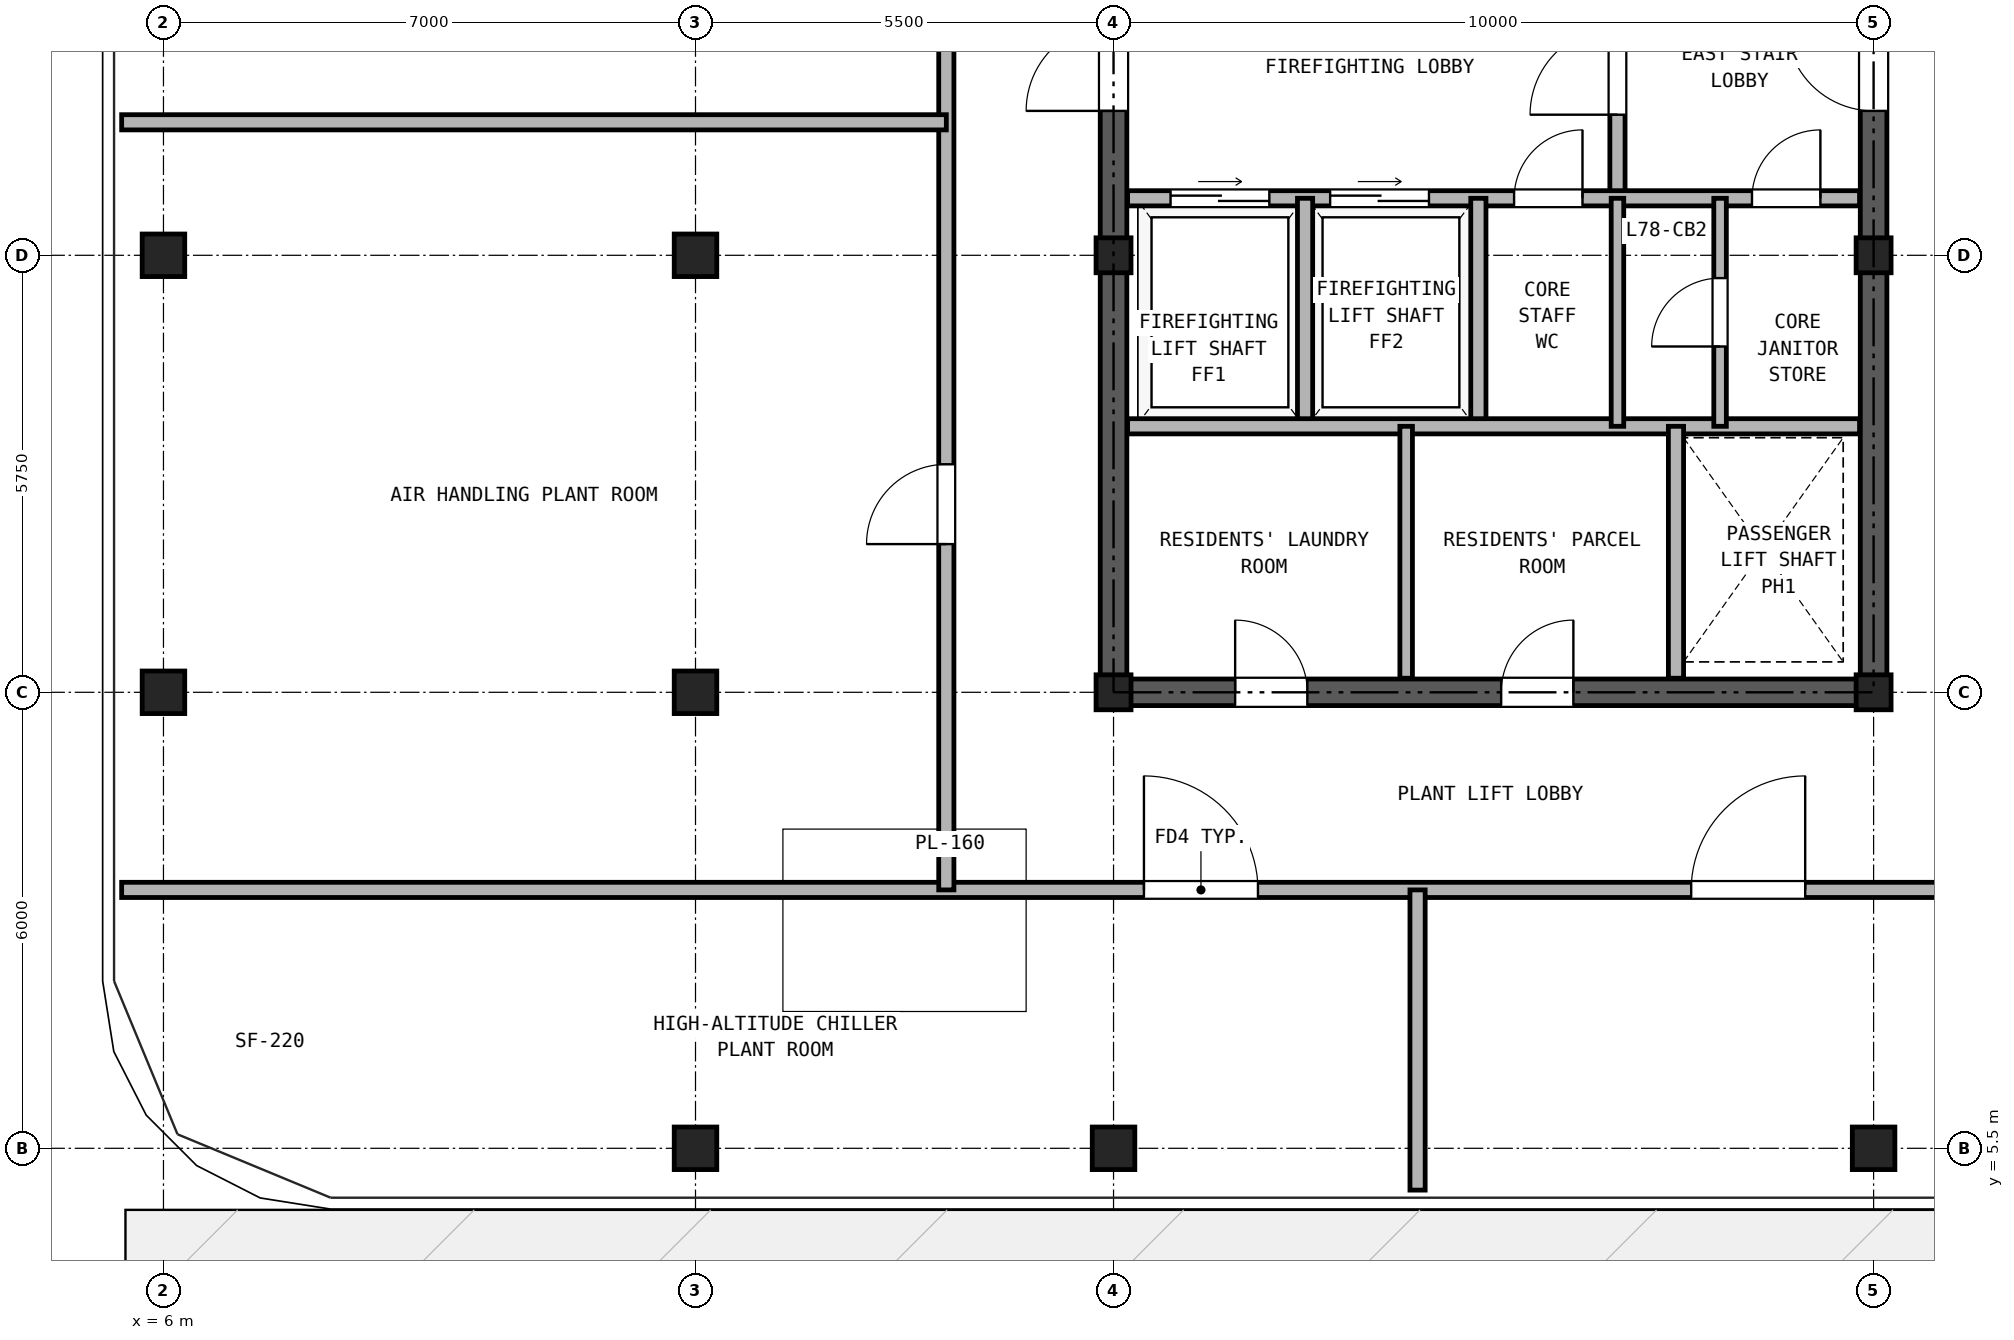
"""IFC4 building model, lengths in metres.
Left out: names, types, materials, properties, quantities, classifications, styles, units other than length and angle.
Written with IfcOpenShell. Run it as: python <this file> out.ifc"""

import sys

from ifc_helpers import new_model, si_unit, direction, frame, frame_2d, origin, origin_2d, place, context, subcontext, project, spatial, rectangle, hollow_rectangle, extrude, source, transform, mapped, element, fill, save


model = new_model("IFC4")
c1 = context("Model", 3, precision=1e-05, world=origin(), true_north=direction((0.0, 1.0)))
c2 = subcontext(c1, "Body", "Model", "MODEL_VIEW")
j1 = project(units=[si_unit("LENGTHUNIT", "METRE"), si_unit("PLANEANGLEUNIT", "RADIAN")], contexts=[c1])
p1 = place(None, origin())
s1 = spatial("IfcSite", under=j1, at=p1, CompositionType="ELEMENT")
p2 = place(p1, origin())
s2 = spatial("IfcBuilding", under=s1, at=p2, CompositionType="ELEMENT")
p3 = place(p2, frame((0.0, 0.0, 271.3)))
s3 = spatial("IfcBuildingStorey", under=s2, at=p3, CompositionType="ELEMENT", Elevation=271.3)
m1 = source(origin(), c2, "Body", "SweptSolid", [
    extrude(hollow_rectangle(XDim=0.56, YDim=0.56, WallThickness=0.03, at=origin_2d()), origin(), (0.0, 0.0, 1.0), 3.38),
])
for number, where, z_axis, x_axis in (
    (1, (13.0, 5.5, 0.0), (0.0, 0.0, 1.0), (1.0, 0.0, 0.0)),
    (2, (18.5, 5.5, 0.0), (0.0, 0.0, 1.0), (1.0, 0.0, 0.0)),
    (3, (28.5, 5.5, 0.0), (0.0, 0.0, 1.0), (1.0, 0.0, 0.0)),
    (4, (6.0, 11.5, 0.0), (0.0, 0.0, 1.0), (1.0, 0.0, 0.0)),
    (5, (6.0, 17.25, 0.0), (0.0, 0.0, 1.0), (1.0, 0.0, 0.0)),
    (6, (13.0, 11.5, 0.0), (0.0, 0.0, 1.0), (1.0, 0.0, 0.0)),
    (7, (13.0, 17.25, 0.0), (0.0, 0.0, 1.0), (1.0, 0.0, 0.0)),
):
    element("IfcColumn", number, at=place(p3, frame(where, z_axis=z_axis, x_axis=x_axis)), inside=s3, PredefinedType="COLUMN", context=c2, shape_type="MappedRepresentation", body=[
        mapped(m1, transform((0.0, 0.0, 0.0), x_axis=(1.0, 0.0, 0.0), y_axis=(0.0, 1.0, 0.0), z_axis=(0.0, 0.0, 1.0), scale=1.0)),
    ])
m2 = source(origin(), c2, "Body", "SweptSolid", [
    extrude(hollow_rectangle(XDim=0.46, YDim=0.46, WallThickness=0.025, at=origin_2d()), origin(), (0.0, 0.0, 1.0), 3.38),
])
for number, where, z_axis, x_axis in (
    (8, (18.5, 11.5, 0.0), (0.0, 0.0, 1.0), (1.0, 0.0, 0.0)),
    (9, (18.5, 17.25, 0.0), (0.0, 0.0, 1.0), (1.0, 0.0, 0.0)),
    (10, (28.5, 11.5, 0.0), (0.0, 0.0, 1.0), (1.0, 0.0, 0.0)),
    (11, (28.5, 17.25, 0.0), (0.0, 0.0, 1.0), (1.0, 0.0, 0.0)),
):
    element("IfcColumn", number, at=place(p3, frame(where, z_axis=z_axis, x_axis=x_axis)), inside=s3, PredefinedType="COLUMN", context=c2, shape_type="MappedRepresentation", body=[
        mapped(m2, transform((0.0, 0.0, 0.0), x_axis=(1.0, 0.0, 0.0), y_axis=(0.0, 1.0, 0.0), z_axis=(0.0, 0.0, 1.0), scale=1.0)),
    ])
p4 = place(p3, frame((18.325, 11.5, 0.0), z_axis=(0.0, 0.0, 1.0), x_axis=(1.0, 0.0, 0.0)))
e12 = element("IfcWall", 12, at=p4, inside=s3, PredefinedType="SHEAR", context=c2, shape_type="SweptSolid", body=[
    extrude(rectangle(XDim=10.35, YDim=0.35, at=frame_2d((5.175, 0.0))), origin(), (0.0, 0.0, 1.0), 3.38),
])
p5 = place(p4, frame((1.775, 0.0, 0.0)))
e13 = element("IfcOpeningElement", 13, at=p5, cuts=e12, PredefinedType="OPENING", context=c2, shape_type="SweptSolid", body=[
    extrude(rectangle(XDim=0.95, YDim=2.15, at=frame_2d((0.475, 1.075))), frame((0.0, 0.185, 0.0), z_axis=(0.0, -1.0, 0.0), x_axis=(1.0, 0.0, 0.0)), (0.0, 0.0, 1.0), 0.37),
])
p6 = place(p4, frame((5.275, 0.0, 0.0)))
e14 = element("IfcOpeningElement", 14, at=p6, cuts=e12, PredefinedType="OPENING", context=c2, shape_type="SweptSolid", body=[
    extrude(rectangle(XDim=0.95, YDim=2.15, at=frame_2d((0.475, 1.075))), frame((0.0, 0.185, 0.0), z_axis=(0.0, -1.0, 0.0), x_axis=(1.0, 0.0, 0.0)), (0.0, 0.0, 1.0), 0.37),
])
p7 = place(p3, frame((18.5, 11.675, 0.0), z_axis=(0.0, 0.0, 1.0), x_axis=(0.0, 1.0, 0.0)))
e15 = element("IfcWall", 15, at=p7, inside=s3, PredefinedType="SHEAR", context=c2, shape_type="SweptSolid", body=[
    extrude(rectangle(XDim=16.9, YDim=0.35, at=frame_2d((8.45, 0.0))), origin(), (0.0, 0.0, 1.0), 3.38),
])
p8 = place(p7, frame((7.475, 0.0, 0.0)))
e16 = element("IfcOpeningElement", 16, at=p8, cuts=e15, PredefinedType="OPENING", context=c2, shape_type="SweptSolid", body=[
    extrude(rectangle(XDim=1.15, YDim=2.2, at=frame_2d((0.575, 1.1))), frame((0.0, 0.185, 0.0), z_axis=(0.0, -1.0, 0.0), x_axis=(1.0, 0.0, 0.0)), (0.0, 0.0, 1.0), 0.37),
])
p9 = place(p3, frame((28.5, 11.675, 0.0), z_axis=(0.0, 0.0, 1.0), x_axis=(0.0, 1.0, 0.0)))
e17 = element("IfcWall", 17, at=p9, inside=s3, PredefinedType="SHEAR", context=c2, shape_type="SweptSolid", body=[
    extrude(rectangle(XDim=16.9, YDim=0.35, at=frame_2d((8.45, 0.0))), origin(), (0.0, 0.0, 1.0), 3.38),
])
p10 = place(p9, frame((7.475, 0.0, 0.0)))
e18 = element("IfcOpeningElement", 18, at=p10, cuts=e17, PredefinedType="OPENING", context=c2, shape_type="SweptSolid", body=[
    extrude(rectangle(XDim=1.15, YDim=2.2, at=frame_2d((0.575, 1.1))), frame((0.0, 0.185, 0.0), z_axis=(0.0, -1.0, 0.0), x_axis=(1.0, 0.0, 0.0)), (0.0, 0.0, 1.0), 0.37),
])
p11 = place(p3, frame((25.13, 18.0, 0.0), z_axis=(0.0, 0.0, 1.0), x_axis=(0.0, 1.0, 0.0)))
e19 = element("IfcWall", 19, at=p11, inside=s3, PredefinedType="PARTITIONING", context=c2, shape_type="SweptSolid", body=[
    extrude(rectangle(XDim=3.39, YDim=0.2, at=frame_2d((1.695, 0.0))), origin(), (0.0, 0.0, 1.0), 3.38),
])
p12 = place(p11, frame((1.1, 0.0, 0.0)))
e20 = element("IfcOpeningElement", 20, at=p12, cuts=e19, PredefinedType="OPENING", context=c2, shape_type="SweptSolid", body=[
    extrude(rectangle(XDim=1.15, YDim=2.2, at=frame_2d((0.575, 1.1))), frame((0.0, 0.11, 0.0), z_axis=(0.0, -1.0, 0.0), x_axis=(1.0, 0.0, 0.0)), (0.0, 0.0, 1.0), 0.22),
])
p13 = place(p3, frame((18.685, 18.0, 0.0), z_axis=(0.0, 0.0, 1.0), x_axis=(1.0, 0.0, 0.0)))
e21 = element("IfcWall", 21, at=p13, inside=s3, PredefinedType="PARTITIONING", context=c2, shape_type="SweptSolid", body=[
    extrude(rectangle(XDim=9.63, YDim=0.2, at=frame_2d((4.815, 0.0))), origin(), (0.0, 0.0, 1.0), 3.38),
])
p14 = place(p13, frame((0.565, 0.0, 0.0)))
e22 = element("IfcOpeningElement", 22, at=p14, cuts=e21, PredefinedType="OPENING", context=c2, shape_type="SweptSolid", body=[
    extrude(rectangle(XDim=1.3, YDim=2.3, at=frame_2d((0.65, 1.15))), frame((0.0, 0.11, 0.0), z_axis=(0.0, -1.0, 0.0), x_axis=(1.0, 0.0, 0.0)), (0.0, 0.0, 1.0), 0.22),
])
p15 = place(p13, frame((2.665, 0.0, 0.0)))
e23 = element("IfcOpeningElement", 23, at=p15, cuts=e21, PredefinedType="OPENING", context=c2, shape_type="SweptSolid", body=[
    extrude(rectangle(XDim=1.3, YDim=2.3, at=frame_2d((0.65, 1.15))), frame((0.0, 0.11, 0.0), z_axis=(0.0, -1.0, 0.0), x_axis=(1.0, 0.0, 0.0)), (0.0, 0.0, 1.0), 0.22),
])
p16 = place(p13, frame((5.085, 0.0, 0.0)))
e24 = element("IfcOpeningElement", 24, at=p16, cuts=e21, PredefinedType="OPENING", context=c2, shape_type="SweptSolid", body=[
    extrude(rectangle(XDim=0.9, YDim=2.05, at=frame_2d((0.45, 1.025))), frame((0.0, 0.11, 0.0), z_axis=(0.0, -1.0, 0.0), x_axis=(1.0, 0.0, 0.0)), (0.0, 0.0, 1.0), 0.22),
])
p17 = place(p13, frame((8.215, 0.0, 0.0)))
e25 = element("IfcOpeningElement", 25, at=p17, cuts=e21, PredefinedType="OPENING", context=c2, shape_type="SweptSolid", body=[
    extrude(rectangle(XDim=0.9, YDim=2.05, at=frame_2d((0.45, 1.025))), frame((0.0, 0.11, 0.0), z_axis=(0.0, -1.0, 0.0), x_axis=(1.0, 0.0, 0.0)), (0.0, 0.0, 1.0), 0.22),
])
for number, where, z_axis, x_axis in (
    (26, (21.02, 15.0, 0.0), (0.0, 0.0, 1.0), (0.0, 1.0, 0.0)),
    (27, (23.3, 15.0, 0.0), (0.0, 0.0, 1.0), (0.0, 1.0, 0.0)),
):
    element("IfcWall", number, at=place(p3, frame(where, z_axis=z_axis, x_axis=x_axis)), inside=s3, PredefinedType="PARTITIONING", context=c2, shape_type="SweptSolid", body=[
        extrude(rectangle(XDim=3.0, YDim=0.2, at=frame_2d((1.5, 0.0))), origin(), (0.0, 0.0, 1.0), 3.38),
    ])
p18 = place(p3, frame((18.685, 15.0, 0.0), z_axis=(0.0, 0.0, 1.0), x_axis=(1.0, 0.0, 0.0)))
e28 = element("IfcWall", 28, at=p18, inside=s3, PredefinedType="PARTITIONING", context=c2, shape_type="SweptSolid", body=[
    extrude(rectangle(XDim=9.63, YDim=0.2, at=frame_2d((4.815, 0.0))), origin(), (0.0, 0.0, 1.0), 3.38),
])
p19 = place(p3, frame((25.13, 15.0, 0.0), z_axis=(0.0, 0.0, 1.0), x_axis=(0.0, 1.0, 0.0)))
e29 = element("IfcWall", 29, at=p19, inside=s3, PredefinedType="PARTITIONING", context=c2, shape_type="SweptSolid", body=[
    extrude(rectangle(XDim=3.0, YDim=0.165, at=frame_2d((1.5, 0.0))), origin(), (0.0, 0.0, 1.0), 3.38),
])
p20 = place(p3, frame((26.48, 15.0, 0.0), z_axis=(0.0, 0.0, 1.0), x_axis=(0.0, 1.0, 0.0)))
e30 = element("IfcWall", 30, at=p20, inside=s3, PredefinedType="PARTITIONING", context=c2, shape_type="SweptSolid", body=[
    extrude(rectangle(XDim=3.0, YDim=0.165, at=frame_2d((1.5, 0.0))), origin(), (0.0, 0.0, 1.0), 3.38),
])
p21 = place(p20, frame((1.05, 0.0, 0.0)))
e31 = element("IfcOpeningElement", 31, at=p21, cuts=e30, PredefinedType="OPENING", context=c2, shape_type="SweptSolid", body=[
    extrude(rectangle(XDim=0.9, YDim=2.05, at=frame_2d((0.45, 1.025))), frame((0.0, 0.093, 0.0), z_axis=(0.0, -1.0, 0.0), x_axis=(1.0, 0.0, 0.0)), (0.0, 0.0, 1.0), 0.185),
])
p22 = place(p3, frame((22.35, 11.685, 0.0), z_axis=(0.0, 0.0, 1.0), x_axis=(0.0, 1.0, 0.0)))
e32 = element("IfcWall", 32, at=p22, inside=s3, PredefinedType="PARTITIONING", context=c2, shape_type="SweptSolid", body=[
    extrude(rectangle(XDim=3.315, YDim=0.165, at=frame_2d((1.657, 0.0))), origin(), (0.0, 0.0, 1.0), 3.38),
])
p23 = place(p3, frame((25.9, 11.685, 0.0), z_axis=(0.0, 0.0, 1.0), x_axis=(0.0, 1.0, 0.0)))
e33 = element("IfcWall", 33, at=p23, inside=s3, PredefinedType="PARTITIONING", context=c2, shape_type="SweptSolid", body=[
    extrude(rectangle(XDim=3.315, YDim=0.2, at=frame_2d((1.657, 0.0))), origin(), (0.0, 0.0, 1.0), 3.38),
])
p24 = place(p3, frame((5.45, 8.9, 0.0), z_axis=(0.0, 0.0, 1.0), x_axis=(1.0, 0.0, 0.0)))
e34 = element("IfcWall", 34, at=p24, inside=s3, PredefinedType="PARTITIONING", context=c2, shape_type="SweptSolid", body=[
    extrude(rectangle(XDim=36.1, YDim=0.2, at=frame_2d((18.05, 0.0))), origin(), (0.0, 0.0, 1.0), 3.38),
])
p25 = place(p24, frame((13.45, 0.0, 0.0)))
e35 = element("IfcOpeningElement", 35, at=p25, cuts=e34, PredefinedType="OPENING", context=c2, shape_type="SweptSolid", body=[
    extrude(rectangle(XDim=1.5, YDim=2.25, at=frame_2d((0.75, 1.125))), frame((0.0, 0.11, 0.0), z_axis=(0.0, -1.0, 0.0), x_axis=(1.0, 0.0, 0.0)), (0.0, 0.0, 1.0), 0.22),
])
p26 = place(p24, frame((20.65, 0.0, 0.0)))
e36 = element("IfcOpeningElement", 36, at=p26, cuts=e34, PredefinedType="OPENING", context=c2, shape_type="SweptSolid", body=[
    extrude(rectangle(XDim=1.5, YDim=2.25, at=frame_2d((0.75, 1.125))), frame((0.0, 0.11, 0.0), z_axis=(0.0, -1.0, 0.0), x_axis=(1.0, 0.0, 0.0)), (0.0, 0.0, 1.0), 0.22),
])
p27 = place(p3, frame((16.3, 8.9, 0.0), z_axis=(0.0, 0.0, 1.0), x_axis=(0.0, 1.0, 0.0)))
e37 = element("IfcWall", 37, at=p27, inside=s3, PredefinedType="PARTITIONING", context=c2, shape_type="SweptSolid", body=[
    extrude(rectangle(XDim=19.85, YDim=0.2, at=frame_2d((9.925, 0.0))), origin(), (0.0, 0.0, 1.0), 3.38),
])
p28 = place(p27, frame((4.55, 0.0, 0.0)))
e38 = element("IfcOpeningElement", 38, at=p28, cuts=e37, PredefinedType="OPENING", context=c2, shape_type="SweptSolid", body=[
    extrude(rectangle(XDim=1.05, YDim=2.15, at=frame_2d((0.525, 1.075))), frame((0.0, 0.11, 0.0), z_axis=(0.0, -1.0, 0.0), x_axis=(1.0, 0.0, 0.0)), (0.0, 0.0, 1.0), 0.22),
])
p29 = place(p27, frame((14.475, 0.0, 0.0)))
e39 = element("IfcOpeningElement", 39, at=p29, cuts=e37, PredefinedType="OPENING", context=c2, shape_type="SweptSolid", body=[
    extrude(rectangle(XDim=1.05, YDim=2.15, at=frame_2d((0.525, 1.075))), frame((0.0, 0.11, 0.0), z_axis=(0.0, -1.0, 0.0), x_axis=(1.0, 0.0, 0.0)), (0.0, 0.0, 1.0), 0.22),
])
p30 = place(p3, frame((22.5, 4.95, 0.0), z_axis=(0.0, 0.0, 1.0), x_axis=(0.0, 1.0, 0.0)))
e40 = element("IfcWall", 40, at=p30, inside=s3, PredefinedType="PARTITIONING", context=c2, shape_type="SweptSolid", body=[
    extrude(rectangle(XDim=3.95, YDim=0.2, at=frame_2d((1.975, 0.0))), origin(), (0.0, 0.0, 1.0), 3.38),
])
p31 = place(p3, frame((5.45, 19.0, 0.0), z_axis=(0.0, 0.0, 1.0), x_axis=(1.0, 0.0, 0.0)))
e41 = element("IfcWall", 41, at=p31, inside=s3, PredefinedType="PARTITIONING", context=c2, shape_type="SweptSolid", body=[
    extrude(rectangle(XDim=10.85, YDim=0.2, at=frame_2d((5.425, 0.0))), origin(), (0.0, 0.0, 1.0), 3.38),
])
p32 = place(p12, origin())
e42 = element("IfcDoor", 42, at=p32, inside=s3, OperationType="SINGLE_SWING_LEFT", PredefinedType="DOOR", context=c2, shape_type="SweptSolid", body=[
    extrude(rectangle(XDim=1.15, YDim=2.2, at=frame_2d((0.575, 1.1))), frame((0.0, 0.025, 0.0), z_axis=(0.0, -1.0, 0.0), x_axis=(1.0, 0.0, 0.0)), (0.0, 0.0, 1.0), 0.05),
])
fill(e20, e42)
p33 = place(p14, origin())
e43 = element("IfcDoor", 43, at=p33, inside=s3, OperationType="DOUBLE_DOOR_SLIDING", PredefinedType="DOOR", context=c2, shape_type="SweptSolid", body=[
    extrude(rectangle(XDim=1.3, YDim=2.3, at=frame_2d((0.65, 1.15))), frame((0.0, 0.025, 0.0), z_axis=(0.0, -1.0, 0.0), x_axis=(1.0, 0.0, 0.0)), (0.0, 0.0, 1.0), 0.05),
])
fill(e22, e43)
p34 = place(p15, origin())
e44 = element("IfcDoor", 44, at=p34, inside=s3, OperationType="DOUBLE_DOOR_SLIDING", PredefinedType="DOOR", context=c2, shape_type="SweptSolid", body=[
    extrude(rectangle(XDim=1.3, YDim=2.3, at=frame_2d((0.65, 1.15))), frame((0.0, 0.025, 0.0), z_axis=(0.0, -1.0, 0.0), x_axis=(1.0, 0.0, 0.0)), (0.0, 0.0, 1.0), 0.05),
])
fill(e23, e44)
p35 = place(p16, frame((0.9, 0.0, 0.0), z_axis=(0.0, 0.0, 1.0), x_axis=(-1.0, 0.0, 0.0)))
e45 = element("IfcDoor", 45, at=p35, inside=s3, OperationType="SINGLE_SWING_RIGHT", PredefinedType="DOOR", context=c2, shape_type="SweptSolid", body=[
    extrude(rectangle(XDim=0.9, YDim=2.05, at=frame_2d((0.45, 1.025))), frame((0.0, 0.025, 0.0), z_axis=(0.0, -1.0, 0.0), x_axis=(1.0, 0.0, 0.0)), (0.0, 0.0, 1.0), 0.05),
])
fill(e24, e45)
p36 = place(p21, origin())
e46 = element("IfcDoor", 46, at=p36, inside=s3, OperationType="SINGLE_SWING_LEFT", PredefinedType="DOOR", context=c2, shape_type="SweptSolid", body=[
    extrude(rectangle(XDim=0.9, YDim=2.05, at=frame_2d((0.45, 1.025))), frame((0.0, 0.025, 0.0), z_axis=(0.0, -1.0, 0.0), x_axis=(1.0, 0.0, 0.0)), (0.0, 0.0, 1.0), 0.05),
])
fill(e31, e46)
p37 = place(p17, frame((0.9, 0.0, 0.0), z_axis=(0.0, 0.0, 1.0), x_axis=(-1.0, 0.0, 0.0)))
e47 = element("IfcDoor", 47, at=p37, inside=s3, OperationType="SINGLE_SWING_RIGHT", PredefinedType="DOOR", context=c2, shape_type="SweptSolid", body=[
    extrude(rectangle(XDim=0.9, YDim=2.05, at=frame_2d((0.45, 1.025))), frame((0.0, 0.025, 0.0), z_axis=(0.0, -1.0, 0.0), x_axis=(1.0, 0.0, 0.0)), (0.0, 0.0, 1.0), 0.05),
])
fill(e25, e47)
p38 = place(p8, frame((1.15, 0.0, 0.0), z_axis=(0.0, 0.0, 1.0), x_axis=(-1.0, 0.0, 0.0)))
e48 = element("IfcDoor", 48, at=p38, inside=s3, OperationType="SINGLE_SWING_LEFT", PredefinedType="DOOR", context=c2, shape_type="SweptSolid", body=[
    extrude(rectangle(XDim=1.15, YDim=2.2, at=frame_2d((0.575, 1.1))), frame((0.0, 0.025, 0.0), z_axis=(0.0, -1.0, 0.0), x_axis=(1.0, 0.0, 0.0)), (0.0, 0.0, 1.0), 0.05),
])
fill(e16, e48)
p39 = place(p10, origin())
e49 = element("IfcDoor", 49, at=p39, inside=s3, OperationType="SINGLE_SWING_RIGHT", PredefinedType="DOOR", context=c2, shape_type="SweptSolid", body=[
    extrude(rectangle(XDim=1.15, YDim=2.2, at=frame_2d((0.575, 1.1))), frame((0.0, 0.025, 0.0), z_axis=(0.0, -1.0, 0.0), x_axis=(1.0, 0.0, 0.0)), (0.0, 0.0, 1.0), 0.05),
])
fill(e18, e49)
p40 = place(p5, frame((0.95, 0.0, 0.0), z_axis=(0.0, 0.0, 1.0), x_axis=(-1.0, 0.0, 0.0)))
e50 = element("IfcDoor", 50, at=p40, inside=s3, OperationType="SINGLE_SWING_LEFT", PredefinedType="DOOR", context=c2, shape_type="SweptSolid", body=[
    extrude(rectangle(XDim=0.95, YDim=2.15, at=frame_2d((0.475, 1.075))), frame((0.0, 0.025, 0.0), z_axis=(0.0, -1.0, 0.0), x_axis=(1.0, 0.0, 0.0)), (0.0, 0.0, 1.0), 0.05),
])
fill(e13, e50)
p41 = place(p6, frame((0.95, 0.0, 0.0), z_axis=(0.0, 0.0, 1.0), x_axis=(-1.0, 0.0, 0.0)))
e51 = element("IfcDoor", 51, at=p41, inside=s3, OperationType="SINGLE_SWING_RIGHT", PredefinedType="DOOR", context=c2, shape_type="SweptSolid", body=[
    extrude(rectangle(XDim=0.95, YDim=2.15, at=frame_2d((0.475, 1.075))), frame((0.0, 0.025, 0.0), z_axis=(0.0, -1.0, 0.0), x_axis=(1.0, 0.0, 0.0)), (0.0, 0.0, 1.0), 0.05),
])
fill(e14, e51)
p42 = place(p25, frame((1.5, 0.0, 0.0), z_axis=(0.0, 0.0, 1.0), x_axis=(-1.0, 0.0, 0.0)))
e52 = element("IfcDoor", 52, at=p42, inside=s3, OperationType="SINGLE_SWING_LEFT", PredefinedType="DOOR", context=c2, shape_type="SweptSolid", body=[
    extrude(rectangle(XDim=1.5, YDim=2.25, at=frame_2d((0.75, 1.125))), frame((0.0, 0.025, 0.0), z_axis=(0.0, -1.0, 0.0), x_axis=(1.0, 0.0, 0.0)), (0.0, 0.0, 1.0), 0.05),
])
fill(e35, e52)
p43 = place(p26, frame((1.5, 0.0, 0.0), z_axis=(0.0, 0.0, 1.0), x_axis=(-1.0, 0.0, 0.0)))
e53 = element("IfcDoor", 53, at=p43, inside=s3, OperationType="SINGLE_SWING_RIGHT", PredefinedType="DOOR", context=c2, shape_type="SweptSolid", body=[
    extrude(rectangle(XDim=1.5, YDim=2.25, at=frame_2d((0.75, 1.125))), frame((0.0, 0.025, 0.0), z_axis=(0.0, -1.0, 0.0), x_axis=(1.0, 0.0, 0.0)), (0.0, 0.0, 1.0), 0.05),
])
fill(e36, e53)
p44 = place(p28, frame((1.05, 0.0, 0.0), z_axis=(0.0, 0.0, 1.0), x_axis=(-1.0, 0.0, 0.0)))
e54 = element("IfcDoor", 54, at=p44, inside=s3, OperationType="SINGLE_SWING_LEFT", PredefinedType="DOOR", context=c2, shape_type="SweptSolid", body=[
    extrude(rectangle(XDim=1.05, YDim=2.15, at=frame_2d((0.525, 1.075))), frame((0.0, 0.025, 0.0), z_axis=(0.0, -1.0, 0.0), x_axis=(1.0, 0.0, 0.0)), (0.0, 0.0, 1.0), 0.05),
])
fill(e38, e54)
save(model, sys.argv[1])
